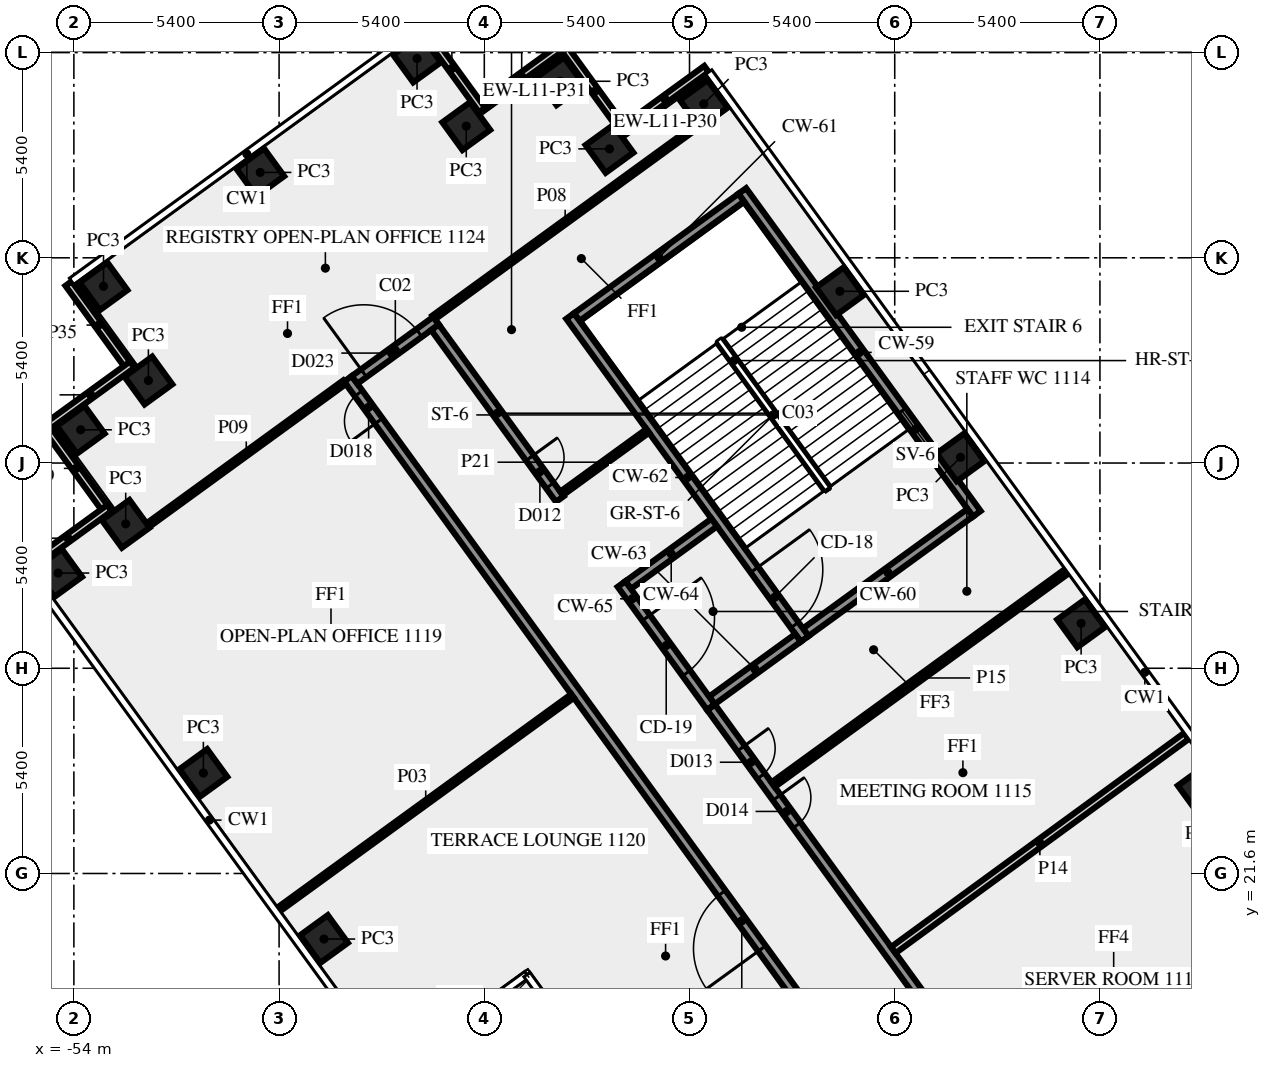
"""IFC4 building model, lengths in metres.
Left out: names, types, materials, properties, quantities, classifications, styles, units other than length and angle.
Written with IfcOpenShell. Run it as: python <this file> out.ifc"""

import sys

from ifc_helpers import new_model, si_unit, direction, frame, frame_2d, origin, origin_2d, place, context, subcontext, project, spatial, rectangle, extrude, element, fill, save


model = new_model("IFC4")
c1 = context("Model", 3, precision=1e-05, world=origin(), true_north=direction((0.0, 1.0)))
c2 = subcontext(c1, "Body", "Model", "MODEL_VIEW")
j1 = project(units=[si_unit("LENGTHUNIT", "METRE"), si_unit("PLANEANGLEUNIT", "RADIAN")], contexts=[c1])
p1 = place(None, origin())
s1 = spatial("IfcSite", under=j1, at=p1, CompositionType="ELEMENT")
p2 = place(p1, origin())
s2 = spatial("IfcBuilding", under=s1, at=p2, CompositionType="ELEMENT")
p3 = place(p2, frame((0.0, 0.0, 51.0)))
s3 = spatial("IfcBuildingStorey", under=s2, at=p3, CompositionType="ELEMENT", Elevation=51.0)
for number, where, z_axis, x_axis in (
    (1, (-24.321, 23.812, 0.0), (0.0, 0.0, 1.0), (-0.588, 0.809, 0.0)),
    (2, (-27.495, 28.181, 0.0), (0.0, 0.0, 1.0), (-0.588, 0.809, 0.0)),
    (3, (-30.669, 32.55, 0.0), (0.0, 0.0, 1.0), (-0.588, 0.809, 0.0)),
    (4, (-33.843, 36.919, 0.0), (0.0, 0.0, 1.0), (-0.588, 0.809, 0.0)),
    (5, (-37.425, 41.85, 0.0), (0.0, 0.0, 1.0), (-0.588, 0.809, 0.0)),
    (6, (-39.906, 40.666, 0.0), (0.0, 0.0, 1.0), (-0.588, 0.809, 0.0)),
    (7, (-41.2, 42.445, 0.0), (0.0, 0.0, 1.0), (-0.588, 0.809, 0.0)),
    (8, (-43.675, 41.265, 0.0), (0.0, 0.0, 1.0), (-0.809, -0.588, 0.0)),
    (9, (-44.97, 43.045, 0.0), (0.0, 0.0, 1.0), (-0.809, -0.588, 0.0)),
    (10, (-49.096, 40.047, 0.0), (0.0, 0.0, 1.0), (-0.809, -0.588, 0.0)),
    (11, (-53.22, 37.05, 0.0), (0.0, 0.0, 1.0), (0.588, -0.809, 0.0)),
    (12, (-52.039, 34.571, 0.0), (0.0, 0.0, 1.0), (-0.809, -0.588, 0.0)),
    (13, (-53.82, 33.275, 0.0), (0.0, 0.0, 1.0), (0.588, -0.809, 0.0)),
    (14, (-52.636, 30.8, 0.0), (0.0, 0.0, 1.0), (-0.809, -0.588, 0.0)),
    (15, (-54.415, 29.505, 0.0), (0.0, 0.0, 1.0), (0.588, -0.809, 0.0)),
    (16, (-50.592, 24.243, 0.0), (0.0, 0.0, 1.0), (0.588, -0.809, 0.0)),
    (17, (-47.418, 19.875, 0.0), (0.0, 0.0, 1.0), (0.588, -0.809, 0.0)),
):
    element("IfcColumn", number, at=place(p3, frame(where, z_axis=z_axis, x_axis=x_axis)), inside=s3, PredefinedType="COLUMN", context=c2, shape_type="SweptSolid", body=[
        extrude(rectangle(XDim=0.9, YDim=0.9, at=origin_2d()), origin(), (0.0, 0.0, 1.0), 3.65),
    ])
p4 = place(p3, frame((-37.353, 42.768, 0.0), z_axis=(0.0, 0.0, 1.0), x_axis=(-0.809033161865, -0.587762999008, 0.0)))
e18 = element("IfcWall", 18, at=p4, inside=s3, PredefinedType="SOLIDWALL", context=c2, shape_type="SweptSolid", body=[
    extrude(rectangle(XDim=2.7, YDim=0.2, at=frame_2d((1.35, 0.0))), origin(), (0.0, 0.0, 1.0), 3.65),
])
p5 = place(p3, frame((-39.488, 41.094, 0.0), z_axis=(0.0, 0.0, 1.0), x_axis=(-0.587806000234, 0.809001919707, 0.0)))
e19 = element("IfcWall", 19, at=p5, inside=s3, PredefinedType="SOLIDWALL", context=c2, shape_type="SweptSolid", body=[
    extrude(rectangle(XDim=2.7, YDim=0.2, at=frame_2d((1.35, 0.0))), origin(), (0.0, 0.0, 1.0), 3.65),
])
for number, where, z_axis, x_axis in (
    (20, (-41.124, 43.366, 0.0), (0.0, 0.0, 1.0), (-0.809, -0.588, 0.0)),
    (21, (-43.259, 41.691, 0.0), (0.0, 0.0, 1.0), (-0.588, 0.809, 0.0)),
    (22, (-54.14, 37.123, 0.0), (0.0, 0.0, 1.0), (0.588, -0.809, 0.0)),
    (23, (-52.465, 34.987, 0.0), (0.0, 0.0, 1.0), (-0.809, -0.588, 0.0)),
):
    element("IfcWall", number, at=place(p3, frame(where, z_axis=z_axis, x_axis=x_axis)), inside=s3, PredefinedType="SOLIDWALL", context=c2, shape_type="SweptSolid", body=[
        extrude(rectangle(XDim=2.7, YDim=0.2, at=frame_2d((1.35, 0.0))), origin(), (0.0, 0.0, 1.0), 3.65),
    ])
p6 = place(p3, frame((-54.738, 33.351, 0.0), z_axis=(0.0, 0.0, 1.0), x_axis=(0.587779184282, -0.809021403008, 0.0)))
e24 = element("IfcWall", 24, at=p6, inside=s3, PredefinedType="SOLIDWALL", context=c2, shape_type="SweptSolid", body=[
    extrude(rectangle(XDim=2.7, YDim=0.2, at=frame_2d((1.35, 0.0))), origin(), (0.0, 0.0, 1.0), 3.65),
])
p7 = place(p3, frame((-53.063, 31.216, 0.0), z_axis=(0.0, 0.0, 1.0), x_axis=(-0.809033161865, -0.587762999008, 0.0)))
e25 = element("IfcWall", 25, at=p7, inside=s3, PredefinedType="SOLIDWALL", context=c2, shape_type="SweptSolid", body=[
    extrude(rectangle(XDim=2.7, YDim=0.2, at=frame_2d((1.35, 0.0))), origin(), (0.0, 0.0, 1.0), 3.65),
])
p8 = place(p3, frame((-30.24, 31.064, 0.0), z_axis=(0.0, 0.0, 1.0), x_axis=(-0.587795589702, 0.809009483706, 0.0)))
e26 = element("IfcWall", 26, at=p8, inside=s3, PredefinedType="SHEAR", context=c2, shape_type="SweptSolid", body=[
    extrude(rectangle(XDim=10.5, YDim=0.25, at=frame_2d((5.25, 0.0))), origin(), (0.0, 0.0, 1.0), 3.65),
])
p9 = place(p8, frame((2.15, 0.0, 1.0)))
e27 = element("IfcOpeningElement", 27, at=p9, cuts=e26, PredefinedType="OPENING", context=c2, shape_type="SweptSolid", body=[
    extrude(rectangle(XDim=1.2, YDim=1.2, at=frame_2d((0.6, 0.6))), frame((0.0, 0.135, 0.0), z_axis=(0.0, -1.0, 0.0), x_axis=(1.0, 0.0, 0.0)), (0.0, 0.0, 1.0), 0.27),
])
p10 = place(p3, frame((-30.414, 31.092, 0.0), z_axis=(0.0, 0.0, 1.0), x_axis=(-0.8089984606, -0.587810760999, 0.0)))
e28 = element("IfcWall", 28, at=p10, inside=s3, PredefinedType="SHEAR", context=c2, shape_type="SweptSolid", body=[
    extrude(rectangle(XDim=5.35, YDim=0.25, at=frame_2d((2.675, 0.0))), origin(), (0.0, 0.0, 1.0), 3.65),
])
p11 = place(p3, frame((-36.439, 39.384, 0.0), z_axis=(0.0, 0.0, 1.0), x_axis=(-0.809020161303, -0.587780893365, 0.0)))
e29 = element("IfcWall", 29, at=p11, inside=s3, PredefinedType="SHEAR", context=c2, shape_type="SweptSolid", body=[
    extrude(rectangle(XDim=5.35, YDim=0.25, at=frame_2d((2.675, 0.0))), origin(), (0.0, 0.0, 1.0), 3.65),
])
p12 = place(p3, frame((-40.942, 36.267, 0.0), z_axis=(0.0, 0.0, 1.0), x_axis=(0.587795589702, -0.809009483706, 0.0)))
e30 = element("IfcWall", 30, at=p12, inside=s3, PredefinedType="SHEAR", context=c2, shape_type="SweptSolid", body=[
    extrude(rectangle(XDim=10.5, YDim=0.25, at=frame_2d((5.25, 0.0))), origin(), (0.0, 0.0, 1.0), 3.65),
])
p13 = place(p12, frame((8.25, 0.0, 0.0)))
e31 = element("IfcOpeningElement", 31, at=p13, cuts=e30, PredefinedType="OPENING", context=c2, shape_type="SweptSolid", body=[
    extrude(rectangle(XDim=1.8, YDim=2.1, at=frame_2d((0.9, 1.05))), frame((0.0, 0.135, 0.0), z_axis=(0.0, -1.0, 0.0), x_axis=(1.0, 0.0, 0.0)), (0.0, 0.0, 1.0), 0.27),
])
for number, where, z_axis, x_axis in (
    (32, (-34.945, 27.8, 0.0), (0.0, 0.0, 1.0), (-0.809, -0.588, 0.0)),
    (33, (-37.149, 30.834, 0.0), (0.0, 0.0, 1.0), (-0.809, -0.588, 0.0)),
):
    element("IfcWall", number, at=place(p3, frame(where, z_axis=z_axis, x_axis=x_axis)), inside=s3, PredefinedType="SHEAR", context=c2, shape_type="SweptSolid", body=[
        extrude(rectangle(XDim=2.8, YDim=0.25, at=frame_2d((1.4, 0.0))), origin(), (0.0, 0.0, 1.0), 3.65),
    ])
p14 = place(p3, frame((-39.589, 29.216, 0.0), z_axis=(0.0, 0.0, 1.0), x_axis=(0.587772420479, -0.809026317077, 0.0)))
e34 = element("IfcWall", 34, at=p14, inside=s3, PredefinedType="SHEAR", context=c2, shape_type="SweptSolid", body=[
    extrude(rectangle(XDim=4.0, YDim=0.25, at=frame_2d((2.0, 0.0))), origin(), (0.0, 0.0, 1.0), 3.65),
])
p15 = place(p14, frame((1.1, 0.0, 0.0)))
e35 = element("IfcOpeningElement", 35, at=p15, cuts=e34, PredefinedType="OPENING", context=c2, shape_type="SweptSolid", body=[
    extrude(rectangle(XDim=1.8, YDim=2.1, at=frame_2d((0.9, 1.05))), frame((0.0, 0.135, 0.0), z_axis=(0.0, -1.0, 0.0), x_axis=(1.0, 0.0, 0.0)), (0.0, 0.0, 1.0), 0.27),
])
p16 = place(p3, frame((-20.531, -1.523, 0.0), z_axis=(0.0, 0.0, 1.0), x_axis=(-0.587784593204, 0.809017473231, 0.0)))
e36 = element("IfcWall", 36, at=p16, inside=s3, PredefinedType="SOLIDWALL", context=c2, shape_type="SweptSolid", body=[
    extrude(rectangle(XDim=44.67, YDim=0.25, at=frame_2d((22.335, 0.0))), origin(), (0.0, 0.0, 1.0), 3.65),
])
p17 = place(p16, frame((26.14, 0.0, 0.0)))
e37 = element("IfcOpeningElement", 37, at=p17, cuts=e36, PredefinedType="OPENING", context=c2, shape_type="SweptSolid", body=[
    extrude(rectangle(XDim=1.8, YDim=2.1, at=frame_2d((0.9, 1.05))), frame((0.0, 0.135, 0.0), z_axis=(0.0, -1.0, 0.0), x_axis=(1.0, 0.0, 0.0)), (0.0, 0.0, 1.0), 0.27),
])
p18 = place(p16, frame((43.296, 0.0, 0.0)))
e38 = element("IfcOpeningElement", 38, at=p18, cuts=e36, PredefinedType="OPENING", context=c2, shape_type="SweptSolid", body=[
    extrude(rectangle(XDim=0.9, YDim=2.1, at=frame_2d((0.45, 1.05))), frame((0.0, 0.135, 0.0), z_axis=(0.0, -1.0, 0.0), x_axis=(1.0, 0.0, 0.0)), (0.0, 0.0, 1.0), 0.27),
])
p19 = place(p16, frame((13.216, 0.0, 0.0)))
e39 = element("IfcOpeningElement", 39, at=p19, cuts=e36, PredefinedType="OPENING", context=c2, shape_type="SweptSolid", body=[
    extrude(rectangle(XDim=0.9, YDim=2.1, at=frame_2d((0.45, 1.05))), frame((0.0, 0.135, 0.0), z_axis=(0.0, -1.0, 0.0), x_axis=(1.0, 0.0, 0.0)), (0.0, 0.0, 1.0), 0.27),
])
p20 = place(p16, frame((7.816, 0.0, 0.0)))
e40 = element("IfcOpeningElement", 40, at=p20, cuts=e36, PredefinedType="OPENING", context=c2, shape_type="SweptSolid", body=[
    extrude(rectangle(XDim=0.9, YDim=2.1, at=frame_2d((0.45, 1.05))), frame((0.0, 0.135, 0.0), z_axis=(0.0, -1.0, 0.0), x_axis=(1.0, 0.0, 0.0)), (0.0, 0.0, 1.0), 0.27),
])
p21 = place(p16, frame((0.533, 0.0, 0.0)))
e41 = element("IfcOpeningElement", 41, at=p21, cuts=e36, PredefinedType="OPENING", context=c2, shape_type="SweptSolid", body=[
    extrude(rectangle(XDim=0.9, YDim=2.1, at=frame_2d((0.45, 1.05))), frame((0.0, 0.135, 0.0), z_axis=(0.0, -1.0, 0.0), x_axis=(1.0, 0.0, 0.0)), (0.0, 0.0, 1.0), 0.27),
])
p22 = place(p3, frame((-46.613, 34.588, 0.0), z_axis=(0.0, 0.0, 1.0), x_axis=(0.808994936898, 0.587815610607, 0.0)))
e42 = element("IfcWall", 42, at=p22, inside=s3, PredefinedType="SOLIDWALL", context=c2, shape_type="SweptSolid", body=[
    extrude(rectangle(XDim=2.65, YDim=0.25, at=frame_2d((1.325, 0.0))), origin(), (0.0, 0.0, 1.0), 3.65),
])
p23 = place(p22, frame((0.299, 0.0, 0.0)))
e43 = element("IfcOpeningElement", 43, at=p23, cuts=e42, PredefinedType="OPENING", context=c2, shape_type="SweptSolid", body=[
    extrude(rectangle(XDim=1.8, YDim=2.1, at=frame_2d((0.9, 1.05))), frame((0.0, 0.135, 0.0), z_axis=(0.0, -1.0, 0.0), x_axis=(1.0, 0.0, 0.0)), (0.0, 0.0, 1.0), 0.27),
])
p24 = place(p3, frame((-44.497, 35.971, 0.0), z_axis=(0.0, 0.0, 1.0), x_axis=(0.587742866856, -0.809047787501, 0.0)))
e44 = element("IfcWall", 44, at=p24, inside=s3, PredefinedType="SOLIDWALL", context=c2, shape_type="SweptSolid", body=[
    extrude(rectangle(XDim=5.586, YDim=0.25, at=frame_2d((2.793, 0.0))), origin(), (0.0, 0.0, 1.0), 3.65),
])
p25 = place(p24, frame((4.245, 0.0, 0.0)))
e45 = element("IfcOpeningElement", 45, at=p25, cuts=e44, PredefinedType="OPENING", context=c2, shape_type="SweptSolid", body=[
    extrude(rectangle(XDim=0.9, YDim=2.1, at=frame_2d((0.45, 1.05))), frame((0.0, 0.135, 0.0), z_axis=(0.0, -1.0, 0.0), x_axis=(1.0, 0.0, 0.0)), (0.0, 0.0, 1.0), 0.27),
])
p26 = place(p3, frame((-37.232, 25.972, 0.0), z_axis=(0.0, 0.0, 1.0), x_axis=(0.587786323093, -0.809016216391, 0.0)))
e46 = element("IfcWall", 46, at=p26, inside=s3, PredefinedType="SOLIDWALL", context=c2, shape_type="SweptSolid", body=[
    extrude(rectangle(XDim=33.493, YDim=0.25, at=frame_2d((16.747, 0.0))), origin(), (0.0, 0.0, 1.0), 3.65),
])
p27 = place(p26, frame((2.935, 0.0, 0.0)))
e47 = element("IfcOpeningElement", 47, at=p27, cuts=e46, PredefinedType="OPENING", context=c2, shape_type="SweptSolid", body=[
    extrude(rectangle(XDim=0.9, YDim=2.1, at=frame_2d((0.45, 1.05))), frame((0.0, 0.135, 0.0), z_axis=(0.0, -1.0, 0.0), x_axis=(1.0, 0.0, 0.0)), (0.0, 0.0, 1.0), 0.27),
])
p28 = place(p26, frame((16.435, 0.0, 0.0)))
e48 = element("IfcOpeningElement", 48, at=p28, cuts=e46, PredefinedType="OPENING", context=c2, shape_type="SweptSolid", body=[
    extrude(rectangle(XDim=0.9, YDim=2.1, at=frame_2d((0.45, 1.05))), frame((0.0, 0.135, 0.0), z_axis=(0.0, -1.0, 0.0), x_axis=(1.0, 0.0, 0.0)), (0.0, 0.0, 1.0), 0.27),
])
p29 = place(p26, frame((29.152, 0.0, 0.0)))
e49 = element("IfcOpeningElement", 49, at=p29, cuts=e46, PredefinedType="OPENING", context=c2, shape_type="SweptSolid", body=[
    extrude(rectangle(XDim=0.9, YDim=2.1, at=frame_2d((0.45, 1.05))), frame((0.0, 0.135, 0.0), z_axis=(0.0, -1.0, 0.0), x_axis=(1.0, 0.0, 0.0)), (0.0, 0.0, 1.0), 0.27),
])
p30 = place(p26, frame((14.536, 0.0, 0.0)))
e50 = element("IfcOpeningElement", 50, at=p30, cuts=e46, PredefinedType="OPENING", context=c2, shape_type="SweptSolid", body=[
    extrude(rectangle(XDim=1.2, YDim=2.1, at=frame_2d((0.6, 1.05))), frame((0.0, 0.135, 0.0), z_axis=(0.0, -1.0, 0.0), x_axis=(1.0, 0.0, 0.0)), (0.0, 0.0, 1.0), 0.27),
])
p31 = place(p26, frame((1.335, 0.0, 0.0)))
e51 = element("IfcOpeningElement", 51, at=p31, cuts=e46, PredefinedType="OPENING", context=c2, shape_type="SweptSolid", body=[
    extrude(rectangle(XDim=0.9, YDim=2.1, at=frame_2d((0.45, 1.05))), frame((0.0, 0.135, 0.0), z_axis=(0.0, -1.0, 0.0), x_axis=(1.0, 0.0, 0.0)), (0.0, 0.0, 1.0), 0.27),
])
p32 = place(p3, frame((-40.878, 26.27, 0.0), z_axis=(0.0, 0.0, 1.0), x_axis=(-0.809102944047, -0.587666934526, 0.0)))
e52 = element("IfcWall", 52, at=p32, inside=s3, PredefinedType="PARTITIONING", context=c2, shape_type="SweptSolid", body=[
    extrude(rectangle(XDim=9.55, YDim=0.12, at=frame_2d((4.775, 0.0))), origin(), (0.0, 0.0, 1.0), 2.75),
])
p33 = place(p3, frame((-37.614, 41.257, 0.0), z_axis=(0.0, 0.0, 1.0), x_axis=(-0.808991595707, -0.587820208972, 0.0)))
e53 = element("IfcWall", 53, at=p33, inside=s3, PredefinedType="PARTITIONING", context=c2, shape_type="SweptSolid", body=[
    extrude(rectangle(XDim=8.551, YDim=0.12, at=frame_2d((4.275, 0.0))), origin(), (0.0, 0.0, 1.0), 3.65),
])
p34 = place(p3, frame((-46.877, 34.526, 0.0), z_axis=(0.0, 0.0, 1.0), x_axis=(-0.808993566199, -0.587817497059, 0.0)))
e54 = element("IfcWall", 54, at=p34, inside=s3, PredefinedType="PARTITIONING", context=c2, shape_type="SweptSolid", body=[
    extrude(rectangle(XDim=6.395, YDim=0.12, at=frame_2d((3.197, 0.0))), origin(), (0.0, 0.0, 1.0), 3.65),
])
p35 = place(p3, frame((-32.437, 19.585, 0.0), z_axis=(0.0, 0.0, 1.0), x_axis=(0.807606997933, 0.589721067023, 0.0)))
e55 = element("IfcWall", 55, at=p35, inside=s3, PredefinedType="SOLIDWALL", context=c2, shape_type="SweptSolid", body=[
    extrude(rectangle(XDim=9.55, YDim=0.2, at=frame_2d((4.775, 0.0))), origin(), (0.0, 0.0, 1.0), 2.75),
])
p36 = place(p3, frame((-27.873, 29.551, 0.0), z_axis=(0.0, 0.0, 1.0), x_axis=(-0.809043311713, -0.587749027879, 0.0)))
e56 = element("IfcWall", 56, at=p36, inside=s3, PredefinedType="PARTITIONING", context=c2, shape_type="SweptSolid", body=[
    extrude(rectangle(XDim=9.55, YDim=0.15, at=frame_2d((4.775, 0.0))), origin(), (0.0, 0.0, 1.0), 2.75),
])
p37 = place(p3, frame((-19.938, 18.629, 0.0), z_axis=(0.0, 0.0, 1.0), x_axis=(-0.80900684162, -0.587799226107, 0.0)))
e57 = element("IfcWall", 57, at=p37, inside=s3, PredefinedType="SOLIDWALL", context=c2, shape_type="SweptSolid", body=[
    extrude(rectangle(XDim=9.55, YDim=0.2, at=frame_2d((4.775, 0.0))), origin(), (0.0, 0.0, 1.0), 2.75),
])
p38 = place(p3, frame((-41.166, 31.599, 0.0), z_axis=(0.0, 0.0, 1.0), x_axis=(0.809090262332, 0.587684394381, 0.0)))
e58 = element("IfcWall", 58, at=p38, inside=s3, PredefinedType="PARTITIONING", context=c2, shape_type="SweptSolid", body=[
    extrude(rectangle(XDim=2.801, YDim=0.12, at=frame_2d((1.4, 0.0))), origin(), (0.0, 0.0, 1.0), 3.65),
])
p39 = place(p9, origin())
e59 = element("IfcWindow", 59, at=p39, inside=s3, PartitioningType="SINGLE_PANEL", PredefinedType="WINDOW", context=c2, shape_type="SweptSolid", body=[
    extrude(rectangle(XDim=1.2, YDim=1.2, at=frame_2d((0.6, 0.6))), frame((0.0, 0.03, 0.0), z_axis=(0.0, -1.0, 0.0), x_axis=(1.0, 0.0, 0.0)), (0.0, 0.0, 1.0), 0.06),
])
fill(e27, e59)
p40 = place(p13, origin())
e60 = element("IfcDoor", 60, at=p40, inside=s3, OperationType="DOUBLE_DOOR_SINGLE_SWING", PredefinedType="DOOR", context=c2, shape_type="SweptSolid", body=[
    extrude(rectangle(XDim=1.8, YDim=2.1, at=frame_2d((0.9, 1.05))), frame((0.0, 0.025, 0.0), z_axis=(0.0, -1.0, 0.0), x_axis=(1.0, 0.0, 0.0)), (0.0, 0.0, 1.0), 0.05),
])
fill(e31, e60)
p41 = place(p15, origin())
e61 = element("IfcDoor", 61, at=p41, inside=s3, OperationType="DOUBLE_DOOR_SINGLE_SWING", PredefinedType="DOOR", context=c2, shape_type="SweptSolid", body=[
    extrude(rectangle(XDim=1.8, YDim=2.1, at=frame_2d((0.9, 1.05))), frame((0.0, 0.025, 0.0), z_axis=(0.0, -1.0, 0.0), x_axis=(1.0, 0.0, 0.0)), (0.0, 0.0, 1.0), 0.05),
])
fill(e35, e61)
p42 = place(p17, origin())
e62 = element("IfcDoor", 62, at=p42, inside=s3, OperationType="DOUBLE_DOOR_SINGLE_SWING", PredefinedType="DOOR", context=c2, shape_type="SweptSolid", body=[
    extrude(rectangle(XDim=1.8, YDim=2.1, at=frame_2d((0.9, 1.05))), frame((0.0, 0.025, 0.0), z_axis=(0.0, -1.0, 0.0), x_axis=(1.0, 0.0, 0.0)), (0.0, 0.0, 1.0), 0.05),
])
fill(e37, e62)
p43 = place(p25, origin())
e63 = element("IfcDoor", 63, at=p43, inside=s3, OperationType="SINGLE_SWING_RIGHT", PredefinedType="DOOR", context=c2, shape_type="SweptSolid", body=[
    extrude(rectangle(XDim=0.9, YDim=2.1, at=frame_2d((0.45, 1.05))), frame((0.0, 0.025, 0.0), z_axis=(0.0, -1.0, 0.0), x_axis=(1.0, 0.0, 0.0)), (0.0, 0.0, 1.0), 0.05),
])
fill(e45, e63)
p44 = place(p18, origin())
e64 = element("IfcDoor", 64, at=p44, inside=s3, OperationType="SINGLE_SWING_RIGHT", PredefinedType="DOOR", context=c2, shape_type="SweptSolid", body=[
    extrude(rectangle(XDim=0.9, YDim=2.1, at=frame_2d((0.45, 1.05))), frame((0.0, 0.025, 0.0), z_axis=(0.0, -1.0, 0.0), x_axis=(1.0, 0.0, 0.0)), (0.0, 0.0, 1.0), 0.05),
])
fill(e38, e64)
p45 = place(p27, origin())
e65 = element("IfcDoor", 65, at=p45, inside=s3, OperationType="SINGLE_SWING_LEFT", PredefinedType="DOOR", context=c2, shape_type="SweptSolid", body=[
    extrude(rectangle(XDim=0.9, YDim=2.1, at=frame_2d((0.45, 1.05))), frame((0.0, 0.025, 0.0), z_axis=(0.0, -1.0, 0.0), x_axis=(1.0, 0.0, 0.0)), (0.0, 0.0, 1.0), 0.05),
])
fill(e47, e65)
p46 = place(p23, origin())
e66 = element("IfcDoor", 66, at=p46, inside=s3, OperationType="DOUBLE_DOOR_SINGLE_SWING", PredefinedType="DOOR", context=c2, shape_type="SweptSolid", body=[
    extrude(rectangle(XDim=1.8, YDim=2.1, at=frame_2d((0.9, 1.05))), frame((0.0, 0.025, 0.0), z_axis=(0.0, -1.0, 0.0), x_axis=(1.0, 0.0, 0.0)), (0.0, 0.0, 1.0), 0.05),
])
fill(e43, e66)
p47 = place(p31, origin())
e67 = element("IfcDoor", 67, at=p47, inside=s3, OperationType="SINGLE_SWING_RIGHT", PredefinedType="DOOR", context=c2, shape_type="SweptSolid", body=[
    extrude(rectangle(XDim=0.9, YDim=2.1, at=frame_2d((0.45, 1.05))), frame((0.0, 0.025, 0.0), z_axis=(0.0, -1.0, 0.0), x_axis=(1.0, 0.0, 0.0)), (0.0, 0.0, 1.0), 0.05),
])
fill(e51, e67)
save(model, sys.argv[1])
